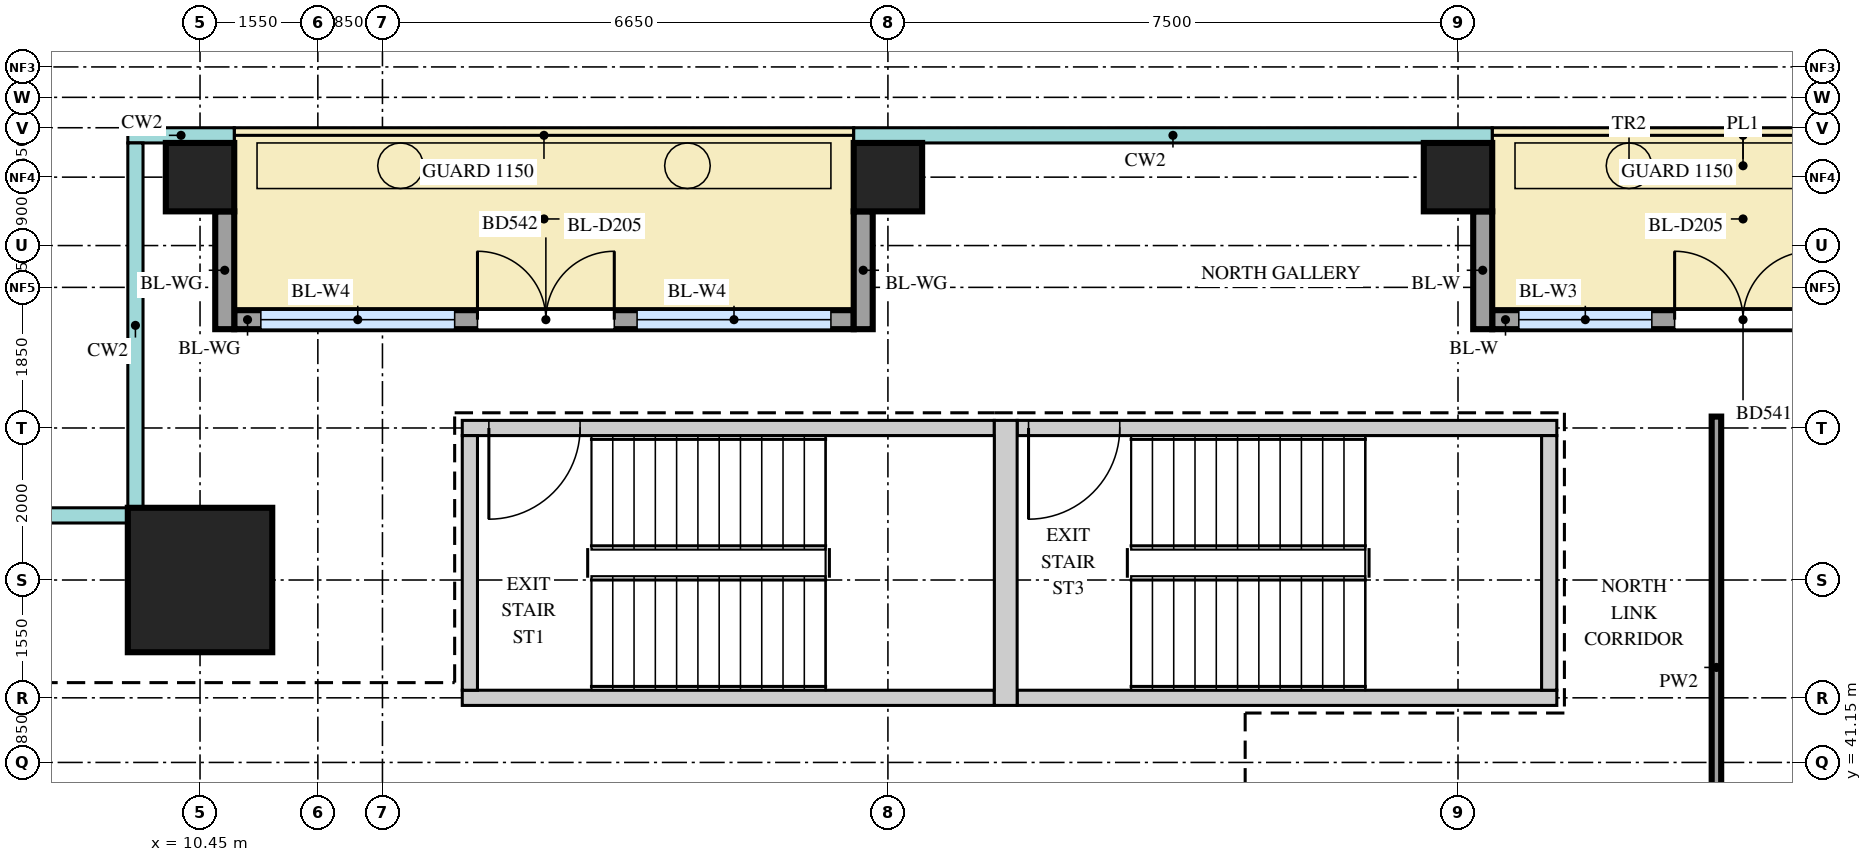
"""IFC4 building model, lengths in metres.
Left out: names, types, materials, properties, quantities, classifications, styles, units other than length and angle.
Written with IfcOpenShell. Run it as: python <this file> out.ifc"""

import sys

from ifc_helpers import new_model, si_unit, direction, frame, frame_2d, origin, origin_2d, place, context, subcontext, project, spatial, rectangle, extrude, source, transform, mapped, element, fill, save


model = new_model("IFC4")
c1 = context("Model", 3, precision=1e-05, world=origin(), true_north=direction((0.0, 1.0)))
c2 = subcontext(c1, "Body", "Model", "MODEL_VIEW")
j1 = project(units=[si_unit("LENGTHUNIT", "METRE"), si_unit("PLANEANGLEUNIT", "RADIAN")], contexts=[c1])
p1 = place(None, origin())
s1 = spatial("IfcSite", under=j1, at=p1, CompositionType="ELEMENT")
p2 = place(p1, origin())
s2 = spatial("IfcBuilding", under=s1, at=p2, CompositionType="ELEMENT")
p3 = place(p2, frame((0.0, 0.0, 242.2)))
s3 = spatial("IfcBuildingStorey", under=s2, at=p3, CompositionType="ELEMENT", Elevation=242.2)
m1 = source(origin(), c2, "Body", "SweptSolid", [
    extrude(rectangle(XDim=7.0, YDim=0.2, at=frame_2d((3.5, 0.0))), origin(), (0.0, 0.0, 1.0), 3.75),
])
p4 = place(p3, frame((13.9, 45.55, 0.0), z_axis=(0.0, 0.0, 1.0), x_axis=(1.0, 0.0, 0.0)))
e1 = element("IfcWall", 1, at=p4, inside=s3, PredefinedType="SHEAR", context=c2, shape_type="MappedRepresentation", body=[
    mapped(m1, transform((0.0, 0.0, 0.0))),
])
m2 = source(origin(), c2, "Body", "SweptSolid", [
    extrude(rectangle(XDim=1.2, YDim=2.1, at=frame_2d((0.6, 1.05))), frame((0.0, 0.11, 0.0), z_axis=(0.0, -1.0, 0.0), x_axis=(1.0, 0.0, 0.0)), (0.0, 0.0, 1.0), 0.22),
])
p5 = place(p4, frame((0.35, 0.0, 0.0)))
e2 = element("IfcOpeningElement", 2, at=p5, cuts=e1, PredefinedType="OPENING", context=c2, shape_type="MappedRepresentation", body=[
    mapped(m2, transform((0.0, 0.0, 0.0))),
])
p6 = place(p3, frame((13.9, 42.0, 0.0), z_axis=(0.0, 0.0, 1.0), x_axis=(1.0, 0.0, 0.0)))
e3 = element("IfcWall", 3, at=p6, inside=s3, PredefinedType="SHEAR", context=c2, shape_type="MappedRepresentation", body=[
    mapped(m1, transform((0.0, 0.0, 0.0))),
])
m3 = source(origin(), c2, "Body", "SweptSolid", [
    extrude(rectangle(XDim=7.1, YDim=0.2, at=frame_2d((3.55, 0.0))), origin(), (0.0, 0.0, 1.0), 3.75),
])
p7 = place(p3, frame((21.2, 45.55, 0.0), z_axis=(0.0, 0.0, 1.0), x_axis=(1.0, 0.0, 0.0)))
e4 = element("IfcWall", 4, at=p7, inside=s3, PredefinedType="SHEAR", context=c2, shape_type="MappedRepresentation", body=[
    mapped(m3, transform((0.0, 0.0, 0.0))),
])
p8 = place(p7, frame((0.15, 0.0, 0.0)))
e5 = element("IfcOpeningElement", 5, at=p8, cuts=e4, PredefinedType="OPENING", context=c2, shape_type="MappedRepresentation", body=[
    mapped(m2, transform((0.0, 0.0, 0.0))),
])
p9 = place(p3, frame((21.2, 42.0, 0.0), z_axis=(0.0, 0.0, 1.0), x_axis=(1.0, 0.0, 0.0)))
e6 = element("IfcWall", 6, at=p9, inside=s3, PredefinedType="SHEAR", context=c2, shape_type="MappedRepresentation", body=[
    mapped(m3, transform((0.0, 0.0, 0.0))),
])
m4 = source(origin(), c2, "Body", "SweptSolid", [
    extrude(rectangle(XDim=3.75, YDim=0.3, at=frame_2d((1.875, 0.0))), origin(), (0.0, 0.0, 1.0), 3.75),
])
p10 = place(p3, frame((21.05, 41.9, 0.0), z_axis=(0.0, 0.0, 1.0), x_axis=(0.0, 1.0, 0.0)))
e7 = element("IfcWall", 7, at=p10, inside=s3, PredefinedType="SHEAR", context=c2, shape_type="MappedRepresentation", body=[
    mapped(m4, transform((0.0, 0.0, 0.0))),
])
m5 = source(origin(), c2, "Body", "SweptSolid", [
    extrude(rectangle(XDim=3.35, YDim=0.2, at=frame_2d((1.675, 0.0))), origin(), (0.0, 0.0, 1.0), 3.75),
])
for number, where, z_axis, x_axis in (
    (8, (14.0, 42.1, 0.0), (0.0, 0.0, 1.0), (0.0, 1.0, 0.0)),
    (9, (28.2, 42.1, 0.0), (0.0, 0.0, 1.0), (0.0, 1.0, 0.0)),
):
    element("IfcWall", number, at=place(p3, frame(where, z_axis=z_axis, x_axis=x_axis)), inside=s3, PredefinedType="SHEAR", context=c2, shape_type="MappedRepresentation", body=[
        mapped(m5, transform((0.0, 0.0, 0.0))),
    ])
m6 = source(origin(), c2, "Body", "SweptSolid", [
    extrude(rectangle(XDim=1.9, YDim=1.9, at=origin_2d()), origin(), (0.0, 0.0, 1.0), 4.0),
])
p11 = place(p3, frame((10.45, 43.55, 0.0), z_axis=(0.0, 0.0, 1.0), x_axis=(1.0, 0.0, 0.0)))
e10 = element("IfcColumn", 10, at=p11, inside=s3, PredefinedType="COLUMN", context=c2, shape_type="MappedRepresentation", body=[
    mapped(m6, transform((0.0, 0.0, 0.0))),
])
m7 = source(origin(), c2, "Body", "SweptSolid", [
    extrude(rectangle(XDim=0.9, YDim=0.9, at=origin_2d()), origin(), (0.0, 0.0, 1.0), 3.75),
])
for number, where, z_axis, x_axis in (
    (11, (10.45, 48.85, 0.0), (0.0, 0.0, 1.0), (1.0, 0.0, 0.0)),
    (12, (19.5, 48.85, 0.0), (0.0, 0.0, 1.0), (1.0, 0.0, 0.0)),
    (13, (27.0, 48.85, 0.0), (0.0, 0.0, 1.0), (1.0, 0.0, 0.0)),
):
    element("IfcColumn", number, at=place(p3, frame(where, z_axis=z_axis, x_axis=x_axis)), inside=s3, PredefinedType="COLUMN", context=c2, shape_type="MappedRepresentation", body=[
        mapped(m7, transform((0.0, 0.0, 0.0))),
    ])
m8 = source(origin(), c2, "Body", "SweptSolid", [
    extrude(rectangle(XDim=6.6, YDim=0.25, at=frame_2d((3.3, 0.0))), origin(), (0.0, 0.0, 1.0), 3.75),
])
p12 = place(p3, frame((27.45, 46.975, 0.0), z_axis=(0.0, 0.0, 1.0), x_axis=(1.0, 0.0, 0.0)))
e14 = element("IfcWall", 14, at=p12, inside=s3, PredefinedType="SOLIDWALL", context=c2, shape_type="MappedRepresentation", body=[
    mapped(m8, transform((0.0, 0.0, 0.0))),
])
m9 = source(origin(), c2, "Body", "SweptSolid", [
    extrude(rectangle(XDim=1.75, YDim=2.4, at=frame_2d((0.875, 1.2))), frame((0.0, 0.135, 0.0), z_axis=(0.0, -1.0, 0.0), x_axis=(1.0, 0.0, 0.0)), (0.0, 0.0, 1.0), 0.27),
])
p13 = place(p12, frame((0.35, 0.0, 0.0)))
e15 = element("IfcOpeningElement", 15, at=p13, cuts=e14, PredefinedType="OPENING", context=c2, shape_type="MappedRepresentation", body=[
    mapped(m9, transform((0.0, 0.0, 0.0))),
])
p14 = place(p12, frame((4.5, 0.0, 0.0)))
e16 = element("IfcOpeningElement", 16, at=p14, cuts=e14, PredefinedType="OPENING", context=c2, shape_type="MappedRepresentation", body=[
    mapped(m9, transform((0.0, 0.0, 0.0))),
])
m10 = source(origin(), c2, "Body", "SweptSolid", [
    extrude(rectangle(XDim=1.8, YDim=2.4, at=frame_2d((0.9, 1.2))), frame((0.0, 0.135, 0.0), z_axis=(0.0, -1.0, 0.0), x_axis=(1.0, 0.0, 0.0)), (0.0, 0.0, 1.0), 0.27),
])
p15 = place(p12, frame((2.4, 0.0, 0.0)))
e17 = element("IfcOpeningElement", 17, at=p15, cuts=e14, PredefinedType="OPENING", context=c2, shape_type="MappedRepresentation", body=[
    mapped(m10, transform((0.0, 0.0, 0.0))),
])
m11 = source(origin(), c2, "Body", "SweptSolid", [
    extrude(rectangle(XDim=1.55, YDim=0.25, at=frame_2d((0.775, 0.0))), origin(), (0.0, 0.0, 1.0), 3.75),
])
p16 = place(p3, frame((27.325, 48.4, 0.0), z_axis=(0.0, 0.0, 1.0), x_axis=(0.0, -1.0, 0.0)))
e18 = element("IfcWall", 18, at=p16, inside=s3, PredefinedType="SOLIDWALL", context=c2, shape_type="MappedRepresentation", body=[
    mapped(m11, transform((0.0, 0.0, 0.0))),
])
m12 = source(origin(), c2, "Body", "SweptSolid", [
    extrude(rectangle(XDim=8.15, YDim=0.25, at=frame_2d((4.075, 0.0))), origin(), (0.0, 0.0, 1.0), 3.35),
])
p17 = place(p3, frame((10.9, 46.975, 0.0), z_axis=(0.0, 0.0, 1.0), x_axis=(1.0, 0.0, 0.0)))
e19 = element("IfcWall", 19, at=p17, inside=s3, PredefinedType="SOLIDWALL", context=c2, shape_type="MappedRepresentation", body=[
    mapped(m12, transform((0.0, 0.0, 0.0))),
])
m13 = source(origin(), c2, "Body", "SweptSolid", [
    extrude(rectangle(XDim=2.55, YDim=2.4, at=frame_2d((1.275, 1.2))), frame((0.0, 0.135, 0.0), z_axis=(0.0, -1.0, 0.0), x_axis=(1.0, 0.0, 0.0)), (0.0, 0.0, 1.0), 0.27),
])
p18 = place(p17, frame((0.35, 0.0, 0.0)))
e20 = element("IfcOpeningElement", 20, at=p18, cuts=e19, PredefinedType="OPENING", context=c2, shape_type="MappedRepresentation", body=[
    mapped(m13, transform((0.0, 0.0, 0.0))),
])
p19 = place(p17, frame((5.3, 0.0, 0.0)))
e21 = element("IfcOpeningElement", 21, at=p19, cuts=e19, PredefinedType="OPENING", context=c2, shape_type="MappedRepresentation", body=[
    mapped(m13, transform((0.0, 0.0, 0.0))),
])
p20 = place(p17, frame((3.2, 0.0, 0.0)))
e22 = element("IfcOpeningElement", 22, at=p20, cuts=e19, PredefinedType="OPENING", context=c2, shape_type="MappedRepresentation", body=[
    mapped(m10, transform((0.0, 0.0, 0.0))),
])
m14 = source(origin(), c2, "Body", "SweptSolid", [
    extrude(rectangle(XDim=1.55, YDim=0.25, at=frame_2d((0.775, 0.0))), origin(), (0.0, 0.0, 1.0), 3.35),
])
for number, where, z_axis, x_axis in (
    (23, (10.775, 48.4, 0.0), (0.0, 0.0, 1.0), (0.0, -1.0, 0.0)),
    (24, (19.175, 48.4, 0.0), (0.0, 0.0, 1.0), (0.0, -1.0, 0.0)),
):
    element("IfcWall", number, at=place(p3, frame(where, z_axis=z_axis, x_axis=x_axis)), inside=s3, PredefinedType="SOLIDWALL", context=c2, shape_type="MappedRepresentation", body=[
        mapped(m14, transform((0.0, 0.0, 0.0))),
    ])
m15 = source(origin(), c2, "Body", "SweptSolid", [
    extrude(rectangle(XDim=6.6, YDim=0.125, at=frame_2d((3.3, 0.0))), origin(), (0.0, 0.0, 1.0), 3.8),
])
p21 = place(p3, frame((30.4, 39.1, 0.0), z_axis=(0.0, 0.0, 1.0), x_axis=(0.0, 1.0, 0.0)))
e25 = element("IfcWall", 25, at=p21, inside=s3, PredefinedType="PARTITIONING", context=c2, shape_type="MappedRepresentation", body=[
    mapped(m15, transform((0.0, 0.0, 0.0))),
])
m16 = source(origin(), c2, "Body", "SweptSolid", [
    extrude(rectangle(XDim=1.75, YDim=2.4, at=frame_2d((0.875, 1.2))), frame((0.0, 0.03, 0.0), z_axis=(0.0, -1.0, 0.0), x_axis=(1.0, 0.0, 0.0)), (0.0, 0.0, 1.0), 0.06),
])
p22 = place(p13, origin())
e26 = element("IfcWindow", 26, at=p22, inside=s3, PartitioningType="SINGLE_PANEL", PredefinedType="WINDOW", context=c2, shape_type="MappedRepresentation", body=[
    mapped(m16, transform((0.0, 0.0, 0.0))),
])
fill(e15, e26)
m17 = source(origin(), c2, "Body", "SweptSolid", [
    extrude(rectangle(XDim=1.8, YDim=2.4, at=frame_2d((0.9, 1.2))), frame((0.0, 0.025, 0.0), z_axis=(0.0, -1.0, 0.0), x_axis=(1.0, 0.0, 0.0)), (0.0, 0.0, 1.0), 0.05),
])
p23 = place(p15, origin())
e27 = element("IfcDoor", 27, at=p23, inside=s3, OperationType="DOUBLE_DOOR_DOUBLE_SWING", PredefinedType="DOOR", context=c2, shape_type="MappedRepresentation", body=[
    mapped(m17, transform((0.0, 0.0, 0.0))),
])
fill(e17, e27)
m18 = source(origin(), c2, "Body", "SweptSolid", [
    extrude(rectangle(XDim=2.55, YDim=2.4, at=frame_2d((1.275, 1.2))), frame((0.0, 0.03, 0.0), z_axis=(0.0, -1.0, 0.0), x_axis=(1.0, 0.0, 0.0)), (0.0, 0.0, 1.0), 0.06),
])
p24 = place(p18, origin())
e28 = element("IfcWindow", 28, at=p24, inside=s3, PartitioningType="SINGLE_PANEL", PredefinedType="WINDOW", context=c2, shape_type="MappedRepresentation", body=[
    mapped(m18, transform((0.0, 0.0, 0.0))),
])
fill(e20, e28)
p25 = place(p19, origin())
e29 = element("IfcWindow", 29, at=p25, inside=s3, PartitioningType="SINGLE_PANEL", PredefinedType="WINDOW", context=c2, shape_type="MappedRepresentation", body=[
    mapped(m18, transform((0.0, 0.0, 0.0))),
])
fill(e21, e29)
p26 = place(p20, origin())
e30 = element("IfcDoor", 30, at=p26, inside=s3, OperationType="DOUBLE_DOOR_DOUBLE_SWING", PredefinedType="DOOR", context=c2, shape_type="MappedRepresentation", body=[
    mapped(m17, transform((0.0, 0.0, 0.0))),
])
fill(e22, e30)
m19 = source(origin(), c2, "Body", "SweptSolid", [
    extrude(rectangle(XDim=1.2, YDim=2.1, at=frame_2d((0.6, 1.05))), frame((0.0, 0.025, 0.0), z_axis=(0.0, -1.0, 0.0), x_axis=(1.0, 0.0, 0.0)), (0.0, 0.0, 1.0), 0.05),
])
p27 = place(p5, origin())
e31 = element("IfcDoor", 31, at=p27, inside=s3, OperationType="SINGLE_SWING_LEFT", PredefinedType="DOOR", context=c2, shape_type="MappedRepresentation", body=[
    mapped(m19, transform((0.0, 0.0, 0.0))),
])
fill(e2, e31)
p28 = place(p8, origin())
e32 = element("IfcDoor", 32, at=p28, inside=s3, OperationType="SINGLE_SWING_LEFT", PredefinedType="DOOR", context=c2, shape_type="MappedRepresentation", body=[
    mapped(m19, transform((0.0, 0.0, 0.0))),
])
fill(e5, e32)
save(model, sys.argv[1])
